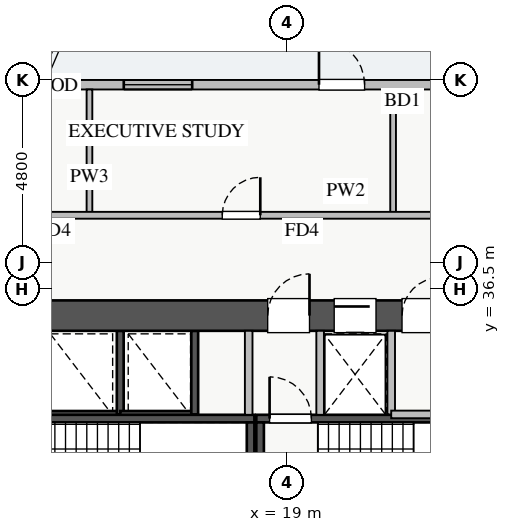
"""IFC4 building model, lengths in metres.
Left out: names, types, materials, properties, quantities, classifications, styles, units other than length and angle.
Written with IfcOpenShell. Run it as: python <this file> out.ifc"""

import sys

from ifc_helpers import new_model, si_unit, direction, frame, frame_2d, origin, place, context, subcontext, project, spatial, rectangle, extrude, source, transform, mapped, element, fill, save


model = new_model("IFC4")
c1 = context("Model", 3, precision=1e-05, world=origin(), true_north=direction((0.0, 1.0)))
c2 = subcontext(c1, "Body", "Model", "MODEL_VIEW")
j1 = project(units=[si_unit("LENGTHUNIT", "METRE"), si_unit("PLANEANGLEUNIT", "RADIAN")], contexts=[c1])
p1 = place(None, origin())
s1 = spatial("IfcSite", under=j1, at=p1, CompositionType="ELEMENT")
p2 = place(p1, origin())
s2 = spatial("IfcBuilding", under=s1, at=p2, CompositionType="ELEMENT")
p3 = place(p2, frame((0.0, 0.0, 60.0)))
s3 = spatial("IfcBuildingStorey", under=s2, at=p3, CompositionType="ELEMENT", Elevation=60.0)
p4 = place(p3, frame((12.68, 33.2, 0.0), z_axis=(0.0, 0.0, 1.0), x_axis=(1.0, 0.0, 0.0)))
e1 = element("IfcWall", 1, at=p4, inside=s3, PredefinedType="SHEAR", context=c2, shape_type="SweptSolid", body=[
    extrude(rectangle(XDim=1.94, YDim=0.18, at=frame_2d((0.97, 0.0))), origin(), (0.0, 0.0, 1.0), 3.07),
])
p5 = place(p3, frame((14.62, 33.2, 0.0), z_axis=(0.0, 0.0, 1.0), x_axis=(0.0, 1.0, 0.0)))
e2 = element("IfcWall", 2, at=p5, inside=s3, PredefinedType="SHEAR", context=c2, shape_type="SweptSolid", body=[
    extrude(rectangle(XDim=2.2, YDim=0.18, at=frame_2d((1.1, 0.0))), origin(), (0.0, 0.0, 1.0), 3.07),
])
p6 = place(p3, frame((14.62, 33.2, 0.0), z_axis=(0.0, 0.0, 1.0), x_axis=(1.0, 0.0, 0.0)))
e3 = element("IfcWall", 3, at=p6, inside=s3, PredefinedType="SHEAR", context=c2, shape_type="SweptSolid", body=[
    extrude(rectangle(XDim=1.96, YDim=0.18, at=frame_2d((0.98, 0.0))), origin(), (0.0, 0.0, 1.0), 3.07),
])
p7 = place(p3, frame((16.58, 33.2, 0.0), z_axis=(0.0, 0.0, 1.0), x_axis=(0.0, 1.0, 0.0)))
e4 = element("IfcWall", 4, at=p7, inside=s3, PredefinedType="SHEAR", context=c2, shape_type="SweptSolid", body=[
    extrude(rectangle(XDim=2.2, YDim=0.18, at=frame_2d((1.1, 0.0))), origin(), (0.0, 0.0, 1.0), 3.07),
])
p8 = place(p3, frame((19.88, 33.2, 0.0), z_axis=(0.0, 0.0, 1.0), x_axis=(1.0, 0.0, 0.0)))
e5 = element("IfcWall", 5, at=p8, inside=s3, PredefinedType="SHEAR", context=c2, shape_type="SweptSolid", body=[
    extrude(rectangle(XDim=1.87, YDim=0.18, at=frame_2d((0.935, 0.0))), origin(), (0.0, 0.0, 1.0), 3.07),
])
p9 = place(p3, frame((11.0, 33.09, 0.0), z_axis=(0.0, 0.0, 1.0), x_axis=(1.0, 0.0, 0.0)))
e6 = element("IfcWall", 6, at=p9, inside=s3, PredefinedType="SHEAR", context=c2, shape_type="SweptSolid", body=[
    extrude(rectangle(XDim=7.15, YDim=0.2, at=frame_2d((3.575, 0.0))), origin(), (0.0, 0.0, 1.0), 3.25),
])
p10 = place(p9, frame((0.35, 0.0, 0.0)))
e7 = element("IfcOpeningElement", 7, at=p10, cuts=e6, PredefinedType="OPENING", context=c2, shape_type="SweptSolid", body=[
    extrude(rectangle(XDim=1.1, YDim=2.05, at=frame_2d((0.55, 1.025))), frame((0.0, 0.11, 0.0), z_axis=(0.0, -1.0, 0.0), x_axis=(1.0, 0.0, 0.0)), (0.0, 0.0, 1.0), 0.22),
])
p11 = place(p3, frame((18.05, 30.05, 0.0), z_axis=(0.0, 0.0, 1.0), x_axis=(0.0, 1.0, 0.0)))
e8 = element("IfcWall", 8, at=p11, inside=s3, PredefinedType="SHEAR", context=c2, shape_type="SweptSolid", body=[
    extrude(rectangle(XDim=2.94, YDim=0.2, at=frame_2d((1.47, 0.0))), origin(), (0.0, 0.0, 1.0), 3.25),
])
p12 = place(p3, frame((18.2, 33.09, 0.0), z_axis=(0.0, 0.0, 1.0), x_axis=(1.0, 0.0, 0.0)))
e9 = element("IfcWall", 9, at=p12, inside=s3, PredefinedType="SHEAR", context=c2, shape_type="SweptSolid", body=[
    extrude(rectangle(XDim=7.15, YDim=0.2, at=frame_2d((3.575, 0.0))), origin(), (0.0, 0.0, 1.0), 3.25),
])
p13 = place(p12, frame((0.35, 0.0, 0.0)))
e10 = element("IfcOpeningElement", 10, at=p13, cuts=e9, PredefinedType="OPENING", context=c2, shape_type="SweptSolid", body=[
    extrude(rectangle(XDim=1.1, YDim=2.05, at=frame_2d((0.55, 1.025))), frame((0.0, 0.11, 0.0), z_axis=(0.0, -1.0, 0.0), x_axis=(1.0, 0.0, 0.0)), (0.0, 0.0, 1.0), 0.22),
])
p14 = place(p3, frame((18.3, 30.05, 0.0), z_axis=(0.0, 0.0, 1.0), x_axis=(0.0, 1.0, 0.0)))
e11 = element("IfcWall", 11, at=p14, inside=s3, PredefinedType="SHEAR", context=c2, shape_type="SweptSolid", body=[
    extrude(rectangle(XDim=2.94, YDim=0.2, at=frame_2d((1.47, 0.0))), origin(), (0.0, 0.0, 1.0), 3.25),
])
p15 = place(p3, frame((10.2, 35.8, 0.0), z_axis=(0.0, 0.0, 1.0), x_axis=(1.0, 0.0, 0.0)))
e12 = element("IfcWall", 12, at=p15, inside=s3, PredefinedType="SHEAR", context=c2, shape_type="SweptSolid", body=[
    extrude(rectangle(XDim=17.6, YDim=0.8, at=frame_2d((8.8, 0.0))), origin(), (0.0, 0.0, 1.0), 3.25),
])
p16 = place(p15, frame((1.15, 0.0, 0.0)))
e13 = element("IfcOpeningElement", 13, at=p16, cuts=e12, PredefinedType="OPENING", context=c2, shape_type="SweptSolid", body=[
    extrude(rectangle(XDim=1.1, YDim=2.05, at=frame_2d((0.55, 1.025))), frame((0.0, 0.41, 0.0), z_axis=(0.0, -1.0, 0.0), x_axis=(1.0, 0.0, 0.0)), (0.0, 0.0, 1.0), 0.82),
])
p17 = place(p15, frame((8.3, 0.0, 0.0)))
e14 = element("IfcOpeningElement", 14, at=p17, cuts=e12, PredefinedType="OPENING", context=c2, shape_type="SweptSolid", body=[
    extrude(rectangle(XDim=1.1, YDim=2.05, at=frame_2d((0.55, 1.025))), frame((0.0, 0.41, 0.0), z_axis=(0.0, -1.0, 0.0), x_axis=(1.0, 0.0, 0.0)), (0.0, 0.0, 1.0), 0.82),
])
p18 = place(p15, frame((10.05, 0.0, 0.0)))
e15 = element("IfcOpeningElement", 15, at=p18, cuts=e12, PredefinedType="OPENING", context=c2, shape_type="SweptSolid", body=[
    extrude(rectangle(XDim=1.1, YDim=2.05, at=frame_2d((0.55, 1.025))), frame((0.0, 0.41, 0.0), z_axis=(0.0, -1.0, 0.0), x_axis=(1.0, 0.0, 0.0)), (0.0, 0.0, 1.0), 0.82),
])
p19 = place(p15, frame((14.74, 0.0, 0.0)))
e16 = element("IfcOpeningElement", 16, at=p19, cuts=e12, PredefinedType="OPENING", context=c2, shape_type="SweptSolid", body=[
    extrude(rectangle(XDim=1.0, YDim=2.05, at=frame_2d((0.5, 1.025))), frame((0.0, 0.41, 0.0), z_axis=(0.0, -1.0, 0.0), x_axis=(1.0, 0.0, 0.0)), (0.0, 0.0, 1.0), 0.82),
])
p20 = place(p15, frame((11.835, 0.0, 0.0)))
e17 = element("IfcOpeningElement", 17, at=p20, cuts=e12, PredefinedType="OPENING", context=c2, shape_type="SweptSolid", body=[
    extrude(rectangle(XDim=1.0, YDim=2.05, at=frame_2d((0.5, 1.025))), frame((0.0, 0.41, 0.0), z_axis=(0.0, -1.0, 0.0), x_axis=(1.0, 0.0, 0.0)), (0.0, 0.0, 1.0), 0.82),
])
p21 = place(p15, frame((13.37, 0.0, 0.0)))
e18 = element("IfcOpeningElement", 18, at=p21, cuts=e12, PredefinedType="OPENING", context=c2, shape_type="SweptSolid", body=[
    extrude(rectangle(XDim=1.0, YDim=2.05, at=frame_2d((0.5, 1.025))), frame((0.0, 0.41, 0.0), z_axis=(0.0, -1.0, 0.0), x_axis=(1.0, 0.0, 0.0)), (0.0, 0.0, 1.0), 0.82),
])
p22 = place(p3, frame((5.45, 41.875, 0.0), z_axis=(0.0, 0.0, 1.0), x_axis=(1.0, 0.0, 0.0)))
e19 = element("IfcWall", 19, at=p22, inside=s3, PredefinedType="STANDARD", context=c2, shape_type="SweptSolid", body=[
    extrude(rectangle(XDim=27.1, YDim=0.25, at=frame_2d((13.55, 0.0))), origin(), (0.0, 0.0, 1.0), 2.61),
])
p23 = place(p22, frame((14.4, 0.0, 0.0)))
e20 = element("IfcOpeningElement", 20, at=p23, cuts=e19, PredefinedType="OPENING", context=c2, shape_type="SweptSolid", body=[
    extrude(rectangle(XDim=1.2, YDim=2.1, at=frame_2d((0.6, 1.05))), frame((0.0, 0.135, 0.0), z_axis=(0.0, -1.0, 0.0), x_axis=(1.0, 0.0, 0.0)), (0.0, 0.0, 1.0), 0.27),
])
p24 = place(p22, frame((1.465, 0.0, 0.9)))
e21 = element("IfcOpeningElement", 21, at=p24, cuts=e19, PredefinedType="OPENING", context=c2, shape_type="SweptSolid", body=[
    extrude(rectangle(XDim=1.5, YDim=1.5, at=frame_2d((0.75, 0.75))), frame((0.0, 0.135, 0.0), z_axis=(0.0, -1.0, 0.0), x_axis=(1.0, 0.0, 0.0)), (0.0, 0.0, 1.0), 0.27),
])
p25 = place(p22, frame((9.263, 0.0, 0.9)))
e22 = element("IfcOpeningElement", 22, at=p25, cuts=e19, PredefinedType="OPENING", context=c2, shape_type="SweptSolid", body=[
    extrude(rectangle(XDim=1.8, YDim=1.45, at=frame_2d((0.9, 0.725))), frame((0.0, 0.135, 0.0), z_axis=(0.0, -1.0, 0.0), x_axis=(1.0, 0.0, 0.0)), (0.0, 0.0, 1.0), 0.27),
])
p26 = place(p22, frame((17.93, 0.0, 0.9)))
e23 = element("IfcOpeningElement", 23, at=p26, cuts=e19, PredefinedType="OPENING", context=c2, shape_type="SweptSolid", body=[
    extrude(rectangle(XDim=1.5, YDim=1.5, at=frame_2d((0.75, 0.75))), frame((0.0, 0.135, 0.0), z_axis=(0.0, -1.0, 0.0), x_axis=(1.0, 0.0, 0.0)), (0.0, 0.0, 1.0), 0.27),
])
p27 = place(p22, frame((22.663, 0.0, 0.9)))
e24 = element("IfcOpeningElement", 24, at=p27, cuts=e19, PredefinedType="OPENING", context=c2, shape_type="SweptSolid", body=[
    extrude(rectangle(XDim=2.1, YDim=1.48, at=frame_2d((1.05, 0.74))), frame((0.0, 0.135, 0.0), z_axis=(0.0, -1.0, 0.0), x_axis=(1.0, 0.0, 0.0)), (0.0, 0.0, 1.0), 0.27),
])
p28 = place(p22, frame((4.63, 0.0, 0.9)))
e25 = element("IfcOpeningElement", 25, at=p28, cuts=e19, PredefinedType="OPENING", context=c2, shape_type="SweptSolid", body=[
    extrude(rectangle(XDim=2.4, YDim=1.5, at=frame_2d((1.2, 0.75))), frame((0.0, 0.135, 0.0), z_axis=(0.0, -1.0, 0.0), x_axis=(1.0, 0.0, 0.0)), (0.0, 0.0, 1.0), 0.27),
])
for number, where, z_axis, x_axis in (
    (26, (18.0, 33.19, 0.0), (0.0, 0.0, 1.0), (0.0, 1.0, 0.0)),
    (27, (19.88, 33.19, 0.0), (0.0, 0.0, 1.0), (0.0, 1.0, 0.0)),
):
    element("IfcWall", number, at=place(p3, frame(where, z_axis=z_axis, x_axis=x_axis)), inside=s3, PredefinedType="PARTITIONING", context=c2, shape_type="SweptSolid", body=[
        extrude(rectangle(XDim=2.21, YDim=0.2, at=frame_2d((1.105, 0.0))), origin(), (0.0, 0.0, 1.0), 3.07),
    ])
p29 = place(p3, frame((21.75, 33.2, 0.0), z_axis=(0.0, 0.0, 1.0), x_axis=(0.0, 1.0, 0.0)))
e28 = element("IfcWall", 28, at=p29, inside=s3, PredefinedType="PARTITIONING", context=c2, shape_type="SweptSolid", body=[
    extrude(rectangle(XDim=2.2, YDim=0.2, at=frame_2d((1.1, 0.0))), origin(), (0.0, 0.0, 1.0), 3.07),
])
p30 = place(p3, frame((21.75, 33.2, 0.0), z_axis=(0.0, 0.0, 1.0), x_axis=(1.0, 0.0, 0.0)))
e29 = element("IfcWall", 29, at=p30, inside=s3, PredefinedType="PARTITIONING", context=c2, shape_type="SweptSolid", body=[
    extrude(rectangle(XDim=5.17, YDim=0.2, at=frame_2d((2.585, 0.0))), origin(), (0.0, 0.0, 1.0), 3.07),
])
for number, where, z_axis, x_axis in (
    (30, (13.81, 38.44, 0.0), (0.0, 0.0, 1.0), (0.0, 1.0, 0.0)),
    (31, (21.8, 38.44, 0.0), (0.0, 0.0, 1.0), (0.0, 1.0, 0.0)),
):
    element("IfcWall", number, at=place(p3, frame(where, z_axis=z_axis, x_axis=x_axis)), inside=s3, PredefinedType="PARTITIONING", context=c2, shape_type="SweptSolid", body=[
        extrude(rectangle(XDim=3.31, YDim=0.15, at=frame_2d((1.655, 0.0))), origin(), (0.0, 0.0, 1.0), 3.07),
    ])
p31 = place(p3, frame((8.75, 38.44, 0.0), z_axis=(0.0, 0.0, 1.0), x_axis=(1.0, 0.0, 0.0)))
e32 = element("IfcWall", 32, at=p31, inside=s3, PredefinedType="PARTITIONING", context=c2, shape_type="SweptSolid", body=[
    extrude(rectangle(XDim=23.61, YDim=0.18, at=frame_2d((11.805, 0.0))), origin(), (0.0, 0.0, 1.0), 3.07),
])
p32 = place(p31, frame((2.03, 0.0, 0.0)))
e33 = element("IfcOpeningElement", 33, at=p32, cuts=e32, PredefinedType="OPENING", context=c2, shape_type="SweptSolid", body=[
    extrude(rectangle(XDim=1.0, YDim=2.05, at=frame_2d((0.5, 1.025))), frame((0.0, 0.1, 0.0), z_axis=(0.0, -1.0, 0.0), x_axis=(1.0, 0.0, 0.0)), (0.0, 0.0, 1.0), 0.2),
])
p33 = place(p31, frame((8.555, 0.0, 0.0)))
e34 = element("IfcOpeningElement", 34, at=p33, cuts=e32, PredefinedType="OPENING", context=c2, shape_type="SweptSolid", body=[
    extrude(rectangle(XDim=1.0, YDim=2.05, at=frame_2d((0.5, 1.025))), frame((0.0, 0.1, 0.0), z_axis=(0.0, -1.0, 0.0), x_axis=(1.0, 0.0, 0.0)), (0.0, 0.0, 1.0), 0.2),
])
p34 = place(p31, frame((14.88, 0.0, 0.0)))
e35 = element("IfcOpeningElement", 35, at=p34, cuts=e32, PredefinedType="OPENING", context=c2, shape_type="SweptSolid", body=[
    extrude(rectangle(XDim=1.0, YDim=2.05, at=frame_2d((0.5, 1.025))), frame((0.0, 0.1, 0.0), z_axis=(0.0, -1.0, 0.0), x_axis=(1.0, 0.0, 0.0)), (0.0, 0.0, 1.0), 0.2),
])
p35 = place(p31, frame((20.16, 0.0, 0.0)))
e36 = element("IfcOpeningElement", 36, at=p35, cuts=e32, PredefinedType="OPENING", context=c2, shape_type="SweptSolid", body=[
    extrude(rectangle(XDim=1.0, YDim=2.05, at=frame_2d((0.5, 1.025))), frame((0.0, 0.1, 0.0), z_axis=(0.0, -1.0, 0.0), x_axis=(1.0, 0.0, 0.0)), (0.0, 0.0, 1.0), 0.2),
])
m1 = source(origin(), c2, "Body", "SweptSolid", [
    extrude(rectangle(XDim=1.2, YDim=2.1, at=frame_2d((0.6, 1.05))), frame((0.0, 0.025, 0.0), z_axis=(0.0, -1.0, 0.0), x_axis=(1.0, 0.0, 0.0)), (0.0, 0.0, 1.0), 0.05),
])
p36 = place(p23, origin())
e37 = element("IfcDoor", 37, at=p36, inside=s3, OperationType="SINGLE_SWING_LEFT", PredefinedType="DOOR", context=c2, shape_type="MappedRepresentation", body=[
    mapped(m1, transform((0.0, 0.0, 0.0), x_axis=(1.0, 0.0, 0.0), y_axis=(0.0, 1.0, 0.0), z_axis=(0.0, 0.0, 1.0), scale=1.0)),
])
fill(e20, e37)
m2 = source(origin(), c2, "Body", "SweptSolid", [
    extrude(rectangle(XDim=1.8, YDim=1.45, at=frame_2d((0.9, 0.725))), frame((0.0, 0.03, 0.0), z_axis=(0.0, -1.0, 0.0), x_axis=(1.0, 0.0, 0.0)), (0.0, 0.0, 1.0), 0.06),
])
p37 = place(p25, origin())
e38 = element("IfcWindow", 38, at=p37, inside=s3, PartitioningType="DOUBLE_PANEL_VERTICAL", PredefinedType="WINDOW", context=c2, shape_type="MappedRepresentation", body=[
    mapped(m2, transform((0.0, 0.0, 0.0), x_axis=(1.0, 0.0, 0.0), y_axis=(0.0, 1.0, 0.0), z_axis=(0.0, 0.0, 1.0), scale=1.0)),
])
fill(e22, e38)
m3 = source(origin(), c2, "Body", "SweptSolid", [
    extrude(rectangle(XDim=1.1, YDim=2.05, at=frame_2d((0.55, 1.025))), frame((0.0, 0.025, 0.0), z_axis=(0.0, -1.0, 0.0), x_axis=(1.0, 0.0, 0.0)), (0.0, 0.0, 1.0), 0.05),
])
p38 = place(p17, origin())
e39 = element("IfcDoor", 39, at=p38, inside=s3, OperationType="SINGLE_SWING_RIGHT", PredefinedType="DOOR", context=c2, shape_type="MappedRepresentation", body=[
    mapped(m3, transform((0.0, 0.0, 0.0), x_axis=(1.0, 0.0, 0.0), y_axis=(0.0, 1.0, 0.0), z_axis=(0.0, 0.0, 1.0), scale=1.0)),
])
fill(e14, e39)
p39 = place(p13, origin())
e40 = element("IfcDoor", 40, at=p39, inside=s3, OperationType="SINGLE_SWING_LEFT", PredefinedType="DOOR", context=c2, shape_type="MappedRepresentation", body=[
    mapped(m3, transform((0.0, 0.0, 0.0), x_axis=(1.0, 0.0, 0.0), y_axis=(0.0, 1.0, 0.0), z_axis=(0.0, 0.0, 1.0), scale=1.0)),
])
fill(e10, e40)
p40 = place(p18, origin())
e41 = element("IfcDoor", 41, at=p40, inside=s3, OperationType="SLIDING_TO_LEFT", PredefinedType="DOOR", context=c2, shape_type="MappedRepresentation", body=[
    mapped(m3, transform((0.0, 0.0, 0.0), x_axis=(1.0, 0.0, 0.0), y_axis=(0.0, 1.0, 0.0), z_axis=(0.0, 0.0, 1.0), scale=1.0)),
])
fill(e15, e41)
m4 = source(origin(), c2, "Body", "SweptSolid", [
    extrude(rectangle(XDim=1.0, YDim=2.05, at=frame_2d((0.5, 1.025))), frame((0.0, 0.025, 0.0), z_axis=(0.0, -1.0, 0.0), x_axis=(1.0, 0.0, 0.0)), (0.0, 0.0, 1.0), 0.05),
])
p41 = place(p20, origin())
e42 = element("IfcDoor", 42, at=p41, inside=s3, OperationType="SINGLE_SWING_RIGHT", PredefinedType="DOOR", context=c2, shape_type="MappedRepresentation", body=[
    mapped(m4, transform((0.0, 0.0, 0.0), x_axis=(1.0, 0.0, 0.0), y_axis=(0.0, 1.0, 0.0), z_axis=(0.0, 0.0, 1.0), scale=1.0)),
])
fill(e17, e42)
p42 = place(p33, origin())
e43 = element("IfcDoor", 43, at=p42, inside=s3, OperationType="SINGLE_SWING_RIGHT", PredefinedType="DOOR", context=c2, shape_type="MappedRepresentation", body=[
    mapped(m4, transform((0.0, 0.0, 0.0), x_axis=(1.0, 0.0, 0.0), y_axis=(0.0, 1.0, 0.0), z_axis=(0.0, 0.0, 1.0), scale=1.0)),
])
fill(e34, e43)
save(model, sys.argv[1])
